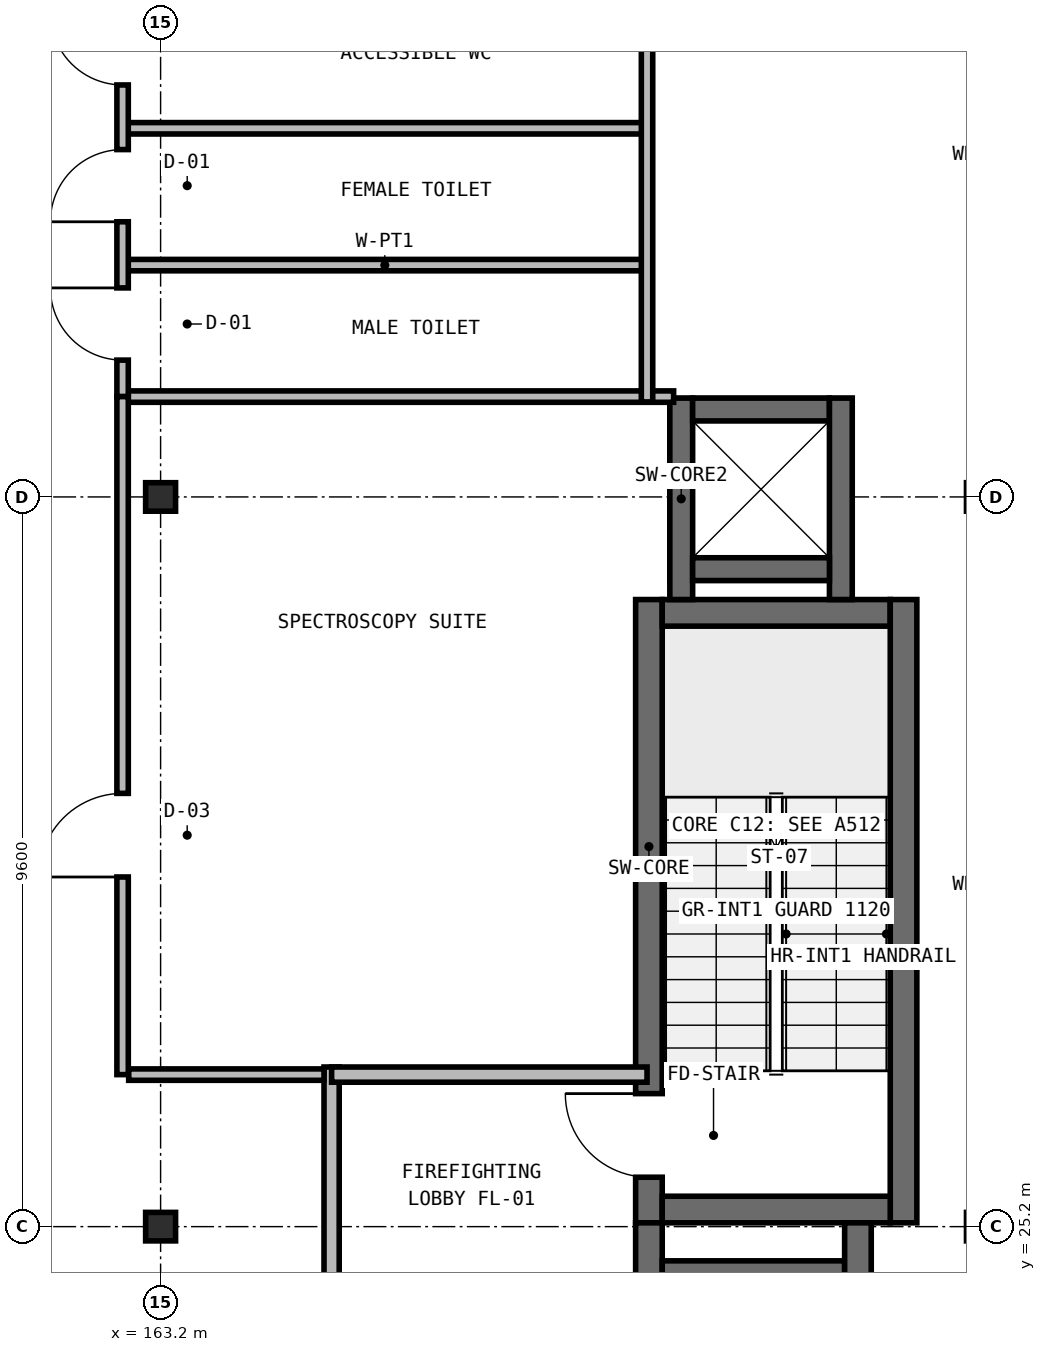
"""IFC4 building model, lengths in metres.
Left out: names, types, materials, properties, quantities, classifications, styles, units other than length and angle.
Written with IfcOpenShell. Run it as: python <this file> out.ifc"""

import sys

from ifc_helpers import new_model, si_unit, direction, frame, frame_2d, origin, origin_2d, place, context, subcontext, project, spatial, rectangle, i_section, extrude, element, fill, save


model = new_model("IFC4")
c1 = context("Model", 3, precision=1e-05, world=origin(), true_north=direction((0.0, 1.0)))
c2 = subcontext(c1, "Body", "Model", "MODEL_VIEW")
j1 = project(units=[si_unit("LENGTHUNIT", "METRE"), si_unit("PLANEANGLEUNIT", "RADIAN")], contexts=[c1])
p1 = place(None, origin())
s1 = spatial("IfcSite", under=j1, at=p1, CompositionType="ELEMENT")
p2 = place(p1, origin())
s2 = spatial("IfcBuilding", under=s1, at=p2, CompositionType="ELEMENT")
p3 = place(p2, frame((0.0, 0.0, 14.35)))
s3 = spatial("IfcBuildingStorey", under=s2, at=p3, CompositionType="ELEMENT", Elevation=14.35)
p4 = place(p3, frame((169.625, 25.25, 0.0), z_axis=(0.0, 0.0, 1.0), x_axis=(0.0, 1.0, 0.0)))
e1 = element("IfcWall", 1, at=p4, inside=s3, PredefinedType="SHEAR", context=c2, shape_type="SweptSolid", body=[
    extrude(rectangle(XDim=8.2, YDim=0.35, at=frame_2d((4.1, 0.0))), origin(), (0.0, 0.0, 1.0), 4.55),
])
p5 = place(p4, frame((0.6, 0.0, 0.0)))
e2 = element("IfcOpeningElement", 2, at=p5, cuts=e1, PredefinedType="OPENING", context=c2, shape_type="SweptSolid", body=[
    extrude(rectangle(XDim=1.1, YDim=2.15, at=frame_2d((0.55, 1.075))), frame((0.0, 0.185, 0.0), z_axis=(0.0, -1.0, 0.0), x_axis=(1.0, 0.0, 0.0)), (0.0, 0.0, 1.0), 0.37),
])
p6 = place(p3, frame((169.8, 33.275, 0.0), z_axis=(0.0, 0.0, 1.0), x_axis=(1.0, 0.0, 0.0)))
e3 = element("IfcWall", 3, at=p6, inside=s3, PredefinedType="SHEAR", context=c2, shape_type="SweptSolid", body=[
    extrude(rectangle(XDim=3.0, YDim=0.35, at=frame_2d((1.5, 0.0))), origin(), (0.0, 0.0, 1.0), 4.55),
])
p7 = place(p3, frame((172.975, 33.45, 0.0), z_axis=(0.0, 0.0, 1.0), x_axis=(0.0, -1.0, 0.0)))
e4 = element("IfcWall", 4, at=p7, inside=s3, PredefinedType="SHEAR", context=c2, shape_type="SweptSolid", body=[
    extrude(rectangle(XDim=8.2, YDim=0.35, at=frame_2d((4.1, 0.0))), origin(), (0.0, 0.0, 1.0), 4.55),
])
p8 = place(p3, frame((172.8, 25.425, 0.0), z_axis=(0.0, 0.0, 1.0), x_axis=(-1.0, 0.0, 0.0)))
e5 = element("IfcWall", 5, at=p8, inside=s3, PredefinedType="SHEAR", context=c2, shape_type="SweptSolid", body=[
    extrude(rectangle(XDim=3.0, YDim=0.35, at=frame_2d((1.5, 0.0))), origin(), (0.0, 0.0, 1.0), 4.55),
])
p9 = place(p3, frame((169.625, 20.55, 0.0), z_axis=(0.0, 0.0, 1.0), x_axis=(0.0, 1.0, 0.0)))
e6 = element("IfcWall", 6, at=p9, inside=s3, PredefinedType="SHEAR", context=c2, shape_type="SweptSolid", body=[
    extrude(rectangle(XDim=4.7, YDim=0.35, at=frame_2d((2.35, 0.0))), origin(), (0.0, 0.0, 1.0), 4.55),
])
p10 = place(p9, frame((1.75, 0.0, 0.0)))
e7 = element("IfcOpeningElement", 7, at=p10, cuts=e6, PredefinedType="OPENING", context=c2, shape_type="SweptSolid", body=[
    extrude(rectangle(XDim=1.2, YDim=2.15, at=frame_2d((0.6, 1.075))), frame((0.0, 0.185, 0.0), z_axis=(0.0, -1.0, 0.0), x_axis=(1.0, 0.0, 0.0)), (0.0, 0.0, 1.0), 0.37),
])
p11 = place(p3, frame((169.8, 24.575, 0.0), z_axis=(0.0, 0.0, 1.0), x_axis=(1.0, 0.0, 0.0)))
e8 = element("IfcWall", 8, at=p11, inside=s3, PredefinedType="SHEAR", context=c2, shape_type="SweptSolid", body=[
    extrude(rectangle(XDim=2.4, YDim=0.35, at=frame_2d((1.2, 0.0))), origin(), (0.0, 0.0, 1.0), 4.55),
])
p12 = place(p3, frame((172.375, 25.25, 0.0), z_axis=(0.0, 0.0, 1.0), x_axis=(0.0, -1.0, 0.0)))
e9 = element("IfcWall", 9, at=p12, inside=s3, PredefinedType="SHEAR", context=c2, shape_type="SweptSolid", body=[
    extrude(rectangle(XDim=4.7, YDim=0.35, at=frame_2d((2.35, 0.0))), origin(), (0.0, 0.0, 1.0), 4.55),
])
for number, where, z_axis, x_axis in (
    (10, (163.2, 25.2, 0.0), (0.0, 0.0, 1.0), (1.0, 0.0, 0.0)),
    (11, (163.2, 34.8, 0.0), (0.0, 0.0, 1.0), (1.0, 0.0, 0.0)),
):
    element("IfcColumn", number, at=place(p3, frame(where, z_axis=z_axis, x_axis=x_axis)), inside=s3, PredefinedType="COLUMN", context=c2, shape_type="SweptSolid", body=[
        extrude(i_section(OverallWidth=0.394, OverallDepth=0.375, WebThickness=0.02, FlangeThickness=0.032, at=origin_2d()), origin(), (0.0, 0.0, 1.0), 4.55),
    ])
p13 = place(p3, frame((170.05, 33.45, 0.0), z_axis=(0.0, 0.0, 1.0), x_axis=(0.0, 1.0, 0.0)))
e12 = element("IfcWall", 12, at=p13, inside=s3, PredefinedType="SHEAR", context=c2, shape_type="SweptSolid", body=[
    extrude(rectangle(XDim=2.65, YDim=0.3, at=frame_2d((1.325, 0.0))), origin(), (0.0, 0.0, 1.0), 4.37),
])
p14 = place(p3, frame((170.2, 35.95, 0.0), z_axis=(0.0, 0.0, 1.0), x_axis=(1.0, 0.0, 0.0)))
e13 = element("IfcWall", 13, at=p14, inside=s3, PredefinedType="SHEAR", context=c2, shape_type="SweptSolid", body=[
    extrude(rectangle(XDim=1.8, YDim=0.3, at=frame_2d((0.9, 0.0))), origin(), (0.0, 0.0, 1.0), 4.37),
])
p15 = place(p3, frame((172.15, 36.1, 0.0), z_axis=(0.0, 0.0, 1.0), x_axis=(0.0, -1.0, 0.0)))
e14 = element("IfcWall", 14, at=p15, inside=s3, PredefinedType="SHEAR", context=c2, shape_type="SweptSolid", body=[
    extrude(rectangle(XDim=2.65, YDim=0.3, at=frame_2d((1.325, 0.0))), origin(), (0.0, 0.0, 1.0), 4.37),
])
p16 = place(p3, frame((172.0, 33.85, 0.0), z_axis=(0.0, 0.0, 1.0), x_axis=(-1.0, 0.0, 0.0)))
e15 = element("IfcWall", 15, at=p16, inside=s3, PredefinedType="SHEAR", context=c2, shape_type="SweptSolid", body=[
    extrude(rectangle(XDim=1.8, YDim=0.3, at=frame_2d((0.9, 0.0))), origin(), (0.0, 0.0, 1.0), 4.37),
])
p17 = place(p3, frame((165.45, 21.3, 0.0), z_axis=(0.0, 0.0, 1.0), x_axis=(0.0, 1.0, 0.0)))
e16 = element("IfcWall", 16, at=p17, inside=s3, PredefinedType="SOLIDWALL", context=c2, shape_type="SweptSolid", body=[
    extrude(rectangle(XDim=6.0, YDim=0.2, at=frame_2d((3.0, 0.0))), origin(), (0.0, 0.0, 1.0), 4.3),
])
p18 = place(p17, frame((1.35, 0.0, 0.0)))
e17 = element("IfcOpeningElement", 17, at=p18, cuts=e16, PredefinedType="OPENING", context=c2, shape_type="SweptSolid", body=[
    extrude(rectangle(XDim=1.1, YDim=2.15, at=frame_2d((0.55, 1.075))), frame((0.0, 0.11, 0.0), z_axis=(0.0, -1.0, 0.0), x_axis=(1.0, 0.0, 0.0)), (0.0, 0.0, 1.0), 0.22),
])
p19 = place(p3, frame((165.45, 27.2, 0.0), z_axis=(0.0, 0.0, 1.0), x_axis=(1.0, 0.0, 0.0)))
e18 = element("IfcWall", 18, at=p19, inside=s3, PredefinedType="SOLIDWALL", context=c2, shape_type="SweptSolid", body=[
    extrude(rectangle(XDim=4.15, YDim=0.2, at=frame_2d((2.075, 0.0))), origin(), (0.0, 0.0, 1.0), 4.3),
])
for number, where, z_axis, x_axis in (
    (19, (162.7, 37.85, 0.0), (0.0, 0.0, 1.0), (1.0, 0.0, 0.0)),
    (20, (162.7, 39.65, 0.0), (0.0, 0.0, 1.0), (1.0, 0.0, 0.0)),
):
    element("IfcWall", number, at=place(p3, frame(where, z_axis=z_axis, x_axis=x_axis)), inside=s3, PredefinedType="PARTITIONING", context=c2, shape_type="SweptSolid", body=[
        extrude(rectangle(XDim=6.9, YDim=0.15, at=frame_2d((3.45, 0.0))), origin(), (0.0, 0.0, 1.0), 4.3),
    ])
p20 = place(p3, frame((162.7, 36.12, 0.0), z_axis=(0.0, 0.0, 1.0), x_axis=(1.0, 0.0, 0.0)))
e21 = element("IfcWall", 21, at=p20, inside=s3, PredefinedType="PARTITIONING", context=c2, shape_type="SweptSolid", body=[
    extrude(rectangle(XDim=7.25, YDim=0.15, at=frame_2d((3.625, 0.0))), origin(), (0.0, 0.0, 1.0), 4.3),
])
p21 = place(p3, frame((169.6, 36.05, 0.0), z_axis=(0.0, 0.0, 1.0), x_axis=(0.0, 1.0, 0.0)))
e22 = element("IfcWall", 22, at=p21, inside=s3, PredefinedType="PARTITIONING", context=c2, shape_type="SweptSolid", body=[
    extrude(rectangle(XDim=5.5, YDim=0.15, at=frame_2d((2.75, 0.0))), origin(), (0.0, 0.0, 1.0), 4.3),
])
p22 = place(p3, frame((162.7, 36.12, 0.0), z_axis=(0.0, 0.0, 1.0), x_axis=(0.0, 1.0, 0.0)))
e23 = element("IfcWall", 23, at=p22, inside=s3, PredefinedType="PARTITIONING", context=c2, shape_type="SweptSolid", body=[
    extrude(rectangle(XDim=5.4, YDim=0.15, at=frame_2d((2.7, 0.0))), origin(), (0.0, 0.0, 1.0), 4.3),
])
p23 = place(p22, frame((0.48, 0.0, 0.0)))
e24 = element("IfcOpeningElement", 24, at=p23, cuts=e23, PredefinedType="OPENING", context=c2, shape_type="SweptSolid", body=[
    extrude(rectangle(XDim=0.95, YDim=2.1, at=frame_2d((0.475, 1.05))), frame((0.0, 0.085, 0.0), z_axis=(0.0, -1.0, 0.0), x_axis=(1.0, 0.0, 0.0)), (0.0, 0.0, 1.0), 0.17),
])
p24 = place(p22, frame((2.3, 0.0, 0.0)))
e25 = element("IfcOpeningElement", 25, at=p24, cuts=e23, PredefinedType="OPENING", context=c2, shape_type="SweptSolid", body=[
    extrude(rectangle(XDim=0.95, YDim=2.1, at=frame_2d((0.475, 1.05))), frame((0.0, 0.085, 0.0), z_axis=(0.0, -1.0, 0.0), x_axis=(1.0, 0.0, 0.0)), (0.0, 0.0, 1.0), 0.17),
])
p25 = place(p22, frame((4.1, 0.0, 0.0)))
e26 = element("IfcOpeningElement", 26, at=p25, cuts=e23, PredefinedType="OPENING", context=c2, shape_type="SweptSolid", body=[
    extrude(rectangle(XDim=0.95, YDim=2.1, at=frame_2d((0.475, 1.05))), frame((0.0, 0.085, 0.0), z_axis=(0.0, -1.0, 0.0), x_axis=(1.0, 0.0, 0.0)), (0.0, 0.0, 1.0), 0.17),
])
p26 = place(p3, frame((162.78, 27.2, 0.0), z_axis=(0.0, 0.0, 1.0), x_axis=(1.0, 0.0, 0.0)))
e27 = element("IfcWall", 27, at=p26, inside=s3, PredefinedType="PARTITIONING", context=c2, shape_type="SweptSolid", body=[
    extrude(rectangle(XDim=2.57, YDim=0.15, at=frame_2d((1.285, 0.0))), origin(), (0.0, 0.0, 1.0), 4.3),
])
p27 = place(p3, frame((162.7, 27.2, 0.0), z_axis=(0.0, 0.0, 1.0), x_axis=(0.0, 1.0, 0.0)))
e28 = element("IfcWall", 28, at=p27, inside=s3, PredefinedType="PARTITIONING", context=c2, shape_type="SweptSolid", body=[
    extrude(rectangle(XDim=8.92, YDim=0.15, at=frame_2d((4.46, 0.0))), origin(), (0.0, 0.0, 1.0), 4.3),
])
p28 = place(p27, frame((2.6, 0.0, 0.0)))
e29 = element("IfcOpeningElement", 29, at=p28, cuts=e28, PredefinedType="OPENING", context=c2, shape_type="SweptSolid", body=[
    extrude(rectangle(XDim=1.1, YDim=2.2, at=frame_2d((0.55, 1.1))), frame((0.0, 0.085, 0.0), z_axis=(0.0, -1.0, 0.0), x_axis=(1.0, 0.0, 0.0)), (0.0, 0.0, 1.0), 0.17),
])
p29 = place(p5, origin())
e30 = element("IfcDoor", 30, at=p29, inside=s3, OperationType="SINGLE_SWING_RIGHT", PredefinedType="DOOR", context=c2, shape_type="SweptSolid", body=[
    extrude(rectangle(XDim=1.1, YDim=2.15, at=frame_2d((0.55, 1.075))), frame((0.0, 0.025, 0.0), z_axis=(0.0, -1.0, 0.0), x_axis=(1.0, 0.0, 0.0)), (0.0, 0.0, 1.0), 0.05),
])
fill(e2, e30)
p30 = place(p23, origin())
e31 = element("IfcDoor", 31, at=p30, inside=s3, OperationType="SINGLE_SWING_RIGHT", PredefinedType="DOOR", context=c2, shape_type="SweptSolid", body=[
    extrude(rectangle(XDim=0.95, YDim=2.1, at=frame_2d((0.475, 1.05))), frame((0.0, 0.025, 0.0), z_axis=(0.0, -1.0, 0.0), x_axis=(1.0, 0.0, 0.0)), (0.0, 0.0, 1.0), 0.05),
])
fill(e24, e31)
p31 = place(p24, origin())
e32 = element("IfcDoor", 32, at=p31, inside=s3, OperationType="SINGLE_SWING_LEFT", PredefinedType="DOOR", context=c2, shape_type="SweptSolid", body=[
    extrude(rectangle(XDim=0.95, YDim=2.1, at=frame_2d((0.475, 1.05))), frame((0.0, 0.025, 0.0), z_axis=(0.0, -1.0, 0.0), x_axis=(1.0, 0.0, 0.0)), (0.0, 0.0, 1.0), 0.05),
])
fill(e25, e32)
p32 = place(p25, origin())
e33 = element("IfcDoor", 33, at=p32, inside=s3, OperationType="SINGLE_SWING_RIGHT", PredefinedType="DOOR", context=c2, shape_type="SweptSolid", body=[
    extrude(rectangle(XDim=0.95, YDim=2.1, at=frame_2d((0.475, 1.05))), frame((0.0, 0.025, 0.0), z_axis=(0.0, -1.0, 0.0), x_axis=(1.0, 0.0, 0.0)), (0.0, 0.0, 1.0), 0.05),
])
fill(e26, e33)
p33 = place(p28, origin())
e34 = element("IfcDoor", 34, at=p33, inside=s3, OperationType="SINGLE_SWING_LEFT", PredefinedType="DOOR", context=c2, shape_type="SweptSolid", body=[
    extrude(rectangle(XDim=1.1, YDim=2.2, at=frame_2d((0.55, 1.1))), frame((0.0, 0.025, 0.0), z_axis=(0.0, -1.0, 0.0), x_axis=(1.0, 0.0, 0.0)), (0.0, 0.0, 1.0), 0.05),
])
fill(e29, e34)
save(model, sys.argv[1])
